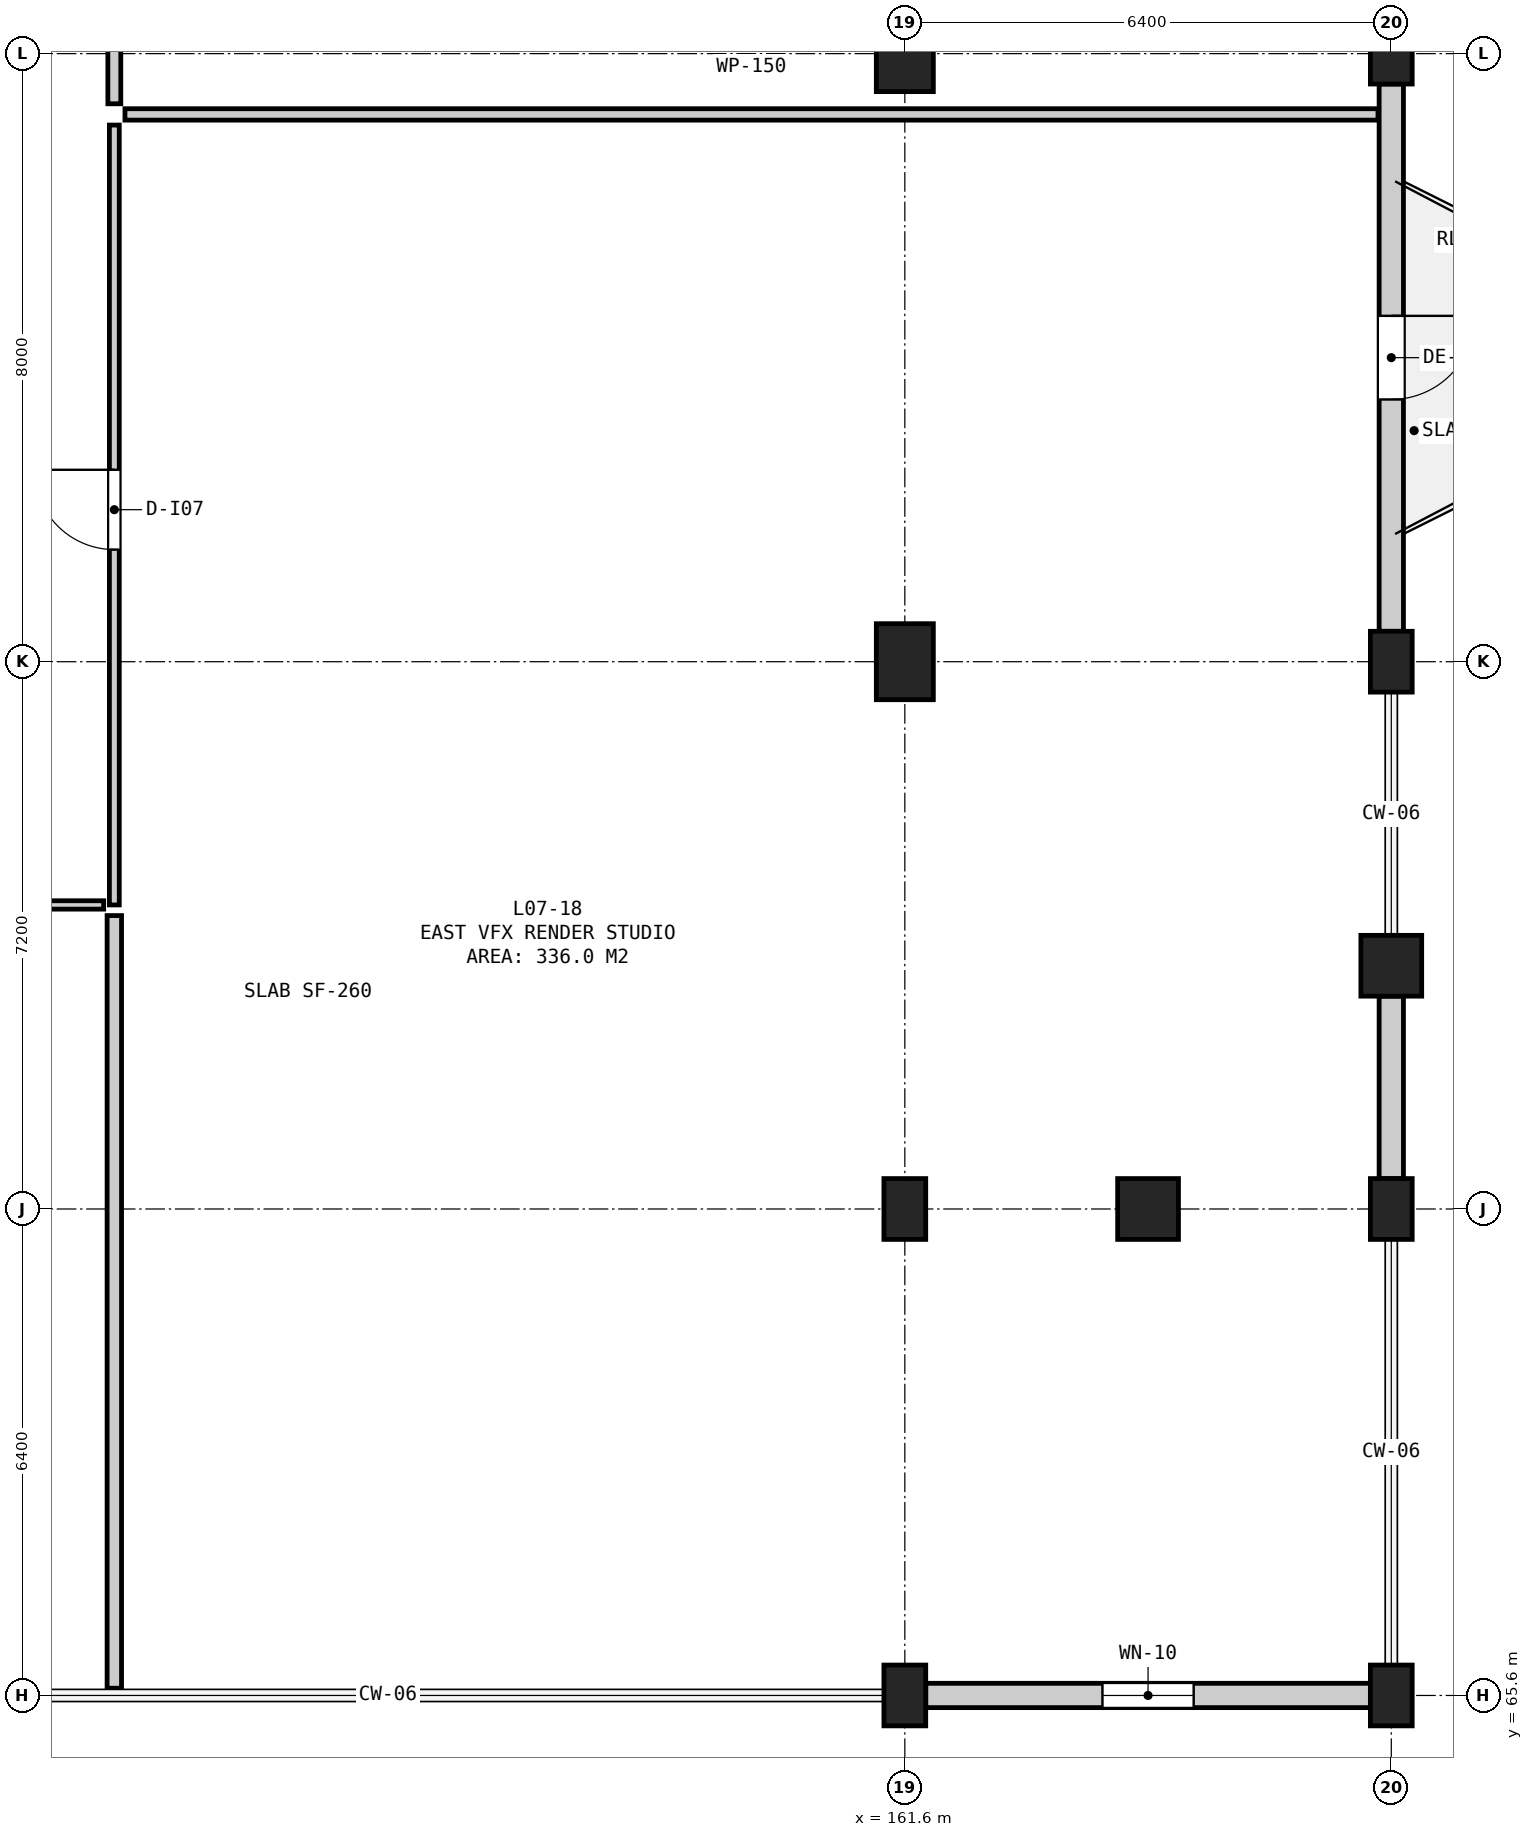
"""IFC4 building model, lengths in metres.
Left out: names, types, materials, properties, quantities, classifications, styles, units other than length and angle.
Written with IfcOpenShell. Run it as: python <this file> out.ifc"""

import sys

from ifc_helpers import new_model, si_unit, direction, frame, frame_2d, origin, origin_2d, place, context, subcontext, project, spatial, rectangle, circle, extrude, element, fill, save


model = new_model("IFC4")
c1 = context("Model", 3, precision=1e-05, world=origin(), true_north=direction((0.0, 1.0)))
c2 = subcontext(c1, "Body", "Model", "MODEL_VIEW")
j1 = project(units=[si_unit("LENGTHUNIT", "METRE"), si_unit("PLANEANGLEUNIT", "RADIAN")], contexts=[c1])
p1 = place(None, origin())
s1 = spatial("IfcSite", under=j1, at=p1, CompositionType="ELEMENT")
p2 = place(p1, origin())
s2 = spatial("IfcBuilding", under=s1, at=p2, CompositionType="ELEMENT")
p3 = place(p2, frame((0.0, 0.0, 31.7)))
s3 = spatial("IfcBuildingStorey", under=s2, at=p3, CompositionType="ELEMENT", Elevation=31.7)
for number, where, z_axis, x_axis in (
    (1, (161.6, 65.6, 0.0), (0.0, 0.0, 1.0), (1.0, 0.0, 0.0)),
    (2, (161.6, 72.0, 0.0), (0.0, 0.0, 1.0), (1.0, 0.0, 0.0)),
):
    element("IfcColumn", number, at=place(p3, frame(where, z_axis=z_axis, x_axis=x_axis)), inside=s3, PredefinedType="COLUMN", context=c2, shape_type="SweptSolid", body=[
        extrude(rectangle(XDim=0.55, YDim=0.8, at=origin_2d()), origin(), (0.0, 0.0, 1.0), 3.9),
    ])
for number, where, z_axis, x_axis in (
    (3, (161.6, 79.2, 0.0), (0.0, 0.0, 1.0), (1.0, 0.0, 0.0)),
    (4, (161.6, 87.2, 0.0), (0.0, 0.0, 1.0), (1.0, 0.0, 0.0)),
):
    element("IfcColumn", number, at=place(p3, frame(where, z_axis=z_axis, x_axis=x_axis)), inside=s3, PredefinedType="COLUMN", context=c2, shape_type="SweptSolid", body=[
        extrude(rectangle(XDim=0.75, YDim=1.0, at=origin_2d()), origin(), (0.0, 0.0, 1.0), 3.9),
    ])
p4 = place(p3, frame((164.8, 72.0, 0.0), z_axis=(0.0, 0.0, 1.0), x_axis=(1.0, 0.0, 0.0)))
e5 = element("IfcColumn", 5, at=p4, inside=s3, PredefinedType="COLUMN", context=c2, shape_type="SweptSolid", body=[
    extrude(circle(Radius=0.4, at=origin_2d()), origin(), (0.0, 0.0, 1.0), 3.9),
])
for number, where, z_axis, x_axis in (
    (6, (168.0, 65.6, 0.0), (0.0, 0.0, 1.0), (1.0, 0.0, 0.0)),
    (7, (168.0, 72.0, 0.0), (0.0, 0.0, 1.0), (1.0, 0.0, 0.0)),
):
    element("IfcColumn", number, at=place(p3, frame(where, z_axis=z_axis, x_axis=x_axis)), inside=s3, PredefinedType="COLUMN", context=c2, shape_type="SweptSolid", body=[
        extrude(rectangle(XDim=0.55, YDim=0.8, at=origin_2d()), origin(), (0.0, 0.0, 1.0), 3.9),
    ])
p5 = place(p3, frame((168.0, 75.2, 0.0), z_axis=(0.0, 0.0, 1.0), x_axis=(1.0, 0.0, 0.0)))
e8 = element("IfcColumn", 8, at=p5, inside=s3, PredefinedType="COLUMN", context=c2, shape_type="SweptSolid", body=[
    extrude(circle(Radius=0.4, at=origin_2d()), origin(), (0.0, 0.0, 1.0), 3.9),
])
for number, where, z_axis, x_axis in (
    (9, (168.0, 79.2, 0.0), (0.0, 0.0, 1.0), (1.0, 0.0, 0.0)),
    (10, (168.0, 87.2, 0.0), (0.0, 0.0, 1.0), (1.0, 0.0, 0.0)),
):
    element("IfcColumn", number, at=place(p3, frame(where, z_axis=z_axis, x_axis=x_axis)), inside=s3, PredefinedType="COLUMN", context=c2, shape_type="SweptSolid", body=[
        extrude(rectangle(XDim=0.55, YDim=0.8, at=origin_2d()), origin(), (0.0, 0.0, 1.0), 3.9),
    ])
p6 = place(p3, frame((161.875, 65.6, 0.0), z_axis=(0.0, 0.0, 1.0), x_axis=(1.0, 0.0, 0.0)))
e11 = element("IfcWall", 11, at=p6, inside=s3, PredefinedType="SOLIDWALL", context=c2, shape_type="SweptSolid", body=[
    extrude(rectangle(XDim=5.85, YDim=0.32, at=frame_2d((2.925, 0.0))), origin(), (0.0, 0.0, 1.0), 3.04),
])
p7 = place(p6, frame((2.325, 0.0, 0.9)))
e12 = element("IfcOpeningElement", 12, at=p7, cuts=e11, PredefinedType="OPENING", context=c2, shape_type="SweptSolid", body=[
    extrude(rectangle(XDim=1.2, YDim=1.7, at=frame_2d((0.6, 0.85))), frame((0.0, 0.172, 0.0), z_axis=(0.0, -1.0, 0.0), x_axis=(1.0, 0.0, 0.0)), (0.0, 0.0, 1.0), 0.344),
])
p8 = place(p3, frame((168.0, 72.4, 0.0), z_axis=(0.0, 0.0, 1.0), x_axis=(0.0, 1.0, 0.0)))
e13 = element("IfcWall", 13, at=p8, inside=s3, PredefinedType="SOLIDWALL", context=c2, shape_type="SweptSolid", body=[
    extrude(rectangle(XDim=2.4, YDim=0.32, at=frame_2d((1.2, 0.0))), origin(), (0.0, 0.0, 1.0), 3.04),
])
p9 = place(p3, frame((168.0, 79.6, 0.0), z_axis=(0.0, 0.0, 1.0), x_axis=(0.0, 1.0, 0.0)))
e14 = element("IfcWall", 14, at=p9, inside=s3, PredefinedType="SOLIDWALL", context=c2, shape_type="SweptSolid", body=[
    extrude(rectangle(XDim=7.2, YDim=0.32, at=frame_2d((3.6, 0.0))), origin(), (0.0, 0.0, 1.0), 3.025),
])
p10 = place(p9, frame((3.05, 0.0, 0.0)))
e15 = element("IfcOpeningElement", 15, at=p10, cuts=e14, PredefinedType="OPENING", context=c2, shape_type="SweptSolid", body=[
    extrude(rectangle(XDim=1.1, YDim=2.2, at=frame_2d((0.55, 1.1))), frame((0.0, 0.172, 0.0), z_axis=(0.0, -1.0, 0.0), x_axis=(1.0, 0.0, 0.0)), (0.0, 0.0, 1.0), 0.344),
])
p11 = place(p3, frame((139.14, 76.0, 0.0), z_axis=(0.0, 0.0, 1.0), x_axis=(1.0, 0.0, 0.0)))
e16 = element("IfcWall", 16, at=p11, inside=s3, PredefinedType="PARTITIONING", context=c2, shape_type="SweptSolid", body=[
    extrude(rectangle(XDim=11.92, YDim=0.11, at=frame_2d((5.96, 0.0))), origin(), (0.0, 0.0, 1.0), 3.62),
])
p12 = place(p11, frame((5.435, 0.0, 0.0)))
e17 = element("IfcOpeningElement", 17, at=p12, cuts=e16, PredefinedType="OPENING", context=c2, shape_type="SweptSolid", body=[
    extrude(rectangle(XDim=1.05, YDim=2.15, at=frame_2d((0.525, 1.075))), frame((0.0, 0.067, 0.0), z_axis=(0.0, -1.0, 0.0), x_axis=(1.0, 0.0, 0.0)), (0.0, 0.0, 1.0), 0.134),
])
p13 = place(p3, frame((151.2, 65.695, 0.0), z_axis=(0.0, 0.0, 1.0), x_axis=(0.0, 1.0, 0.0)))
e18 = element("IfcWall", 18, at=p13, inside=s3, PredefinedType="PARTITIONING", context=c2, shape_type="SweptSolid", body=[
    extrude(rectangle(XDim=10.165, YDim=0.19, at=frame_2d((5.083, 0.0))), origin(), (0.0, 0.0, 1.0), 3.62),
])
p14 = place(p3, frame((151.34, 86.4, 0.0), z_axis=(0.0, 0.0, 1.0), x_axis=(1.0, 0.0, 0.0)))
e19 = element("IfcWall", 19, at=p14, inside=s3, PredefinedType="PARTITIONING", context=c2, shape_type="SweptSolid", body=[
    extrude(rectangle(XDim=16.485, YDim=0.15, at=frame_2d((8.242, 0.0))), origin(), (0.0, 0.0, 1.0), 3.62),
])
p15 = place(p3, frame((151.2, 76.0, 0.0), z_axis=(0.0, 0.0, 1.0), x_axis=(0.0, 1.0, 0.0)))
e20 = element("IfcWall", 20, at=p15, inside=s3, PredefinedType="PARTITIONING", context=c2, shape_type="SweptSolid", body=[
    extrude(rectangle(XDim=10.26, YDim=0.13, at=frame_2d((5.13, 0.0))), origin(), (0.0, 0.0, 1.0), 3.62),
])
p16 = place(p15, frame((4.675, 0.0, 0.0)))
e21 = element("IfcOpeningElement", 21, at=p16, cuts=e20, PredefinedType="OPENING", context=c2, shape_type="SweptSolid", body=[
    extrude(rectangle(XDim=1.05, YDim=2.15, at=frame_2d((0.525, 1.075))), frame((0.0, 0.077, 0.0), z_axis=(0.0, -1.0, 0.0), x_axis=(1.0, 0.0, 0.0)), (0.0, 0.0, 1.0), 0.154),
])
p17 = place(p3, frame((151.2, 86.54, 0.0), z_axis=(0.0, 0.0, 1.0), x_axis=(0.0, 1.0, 0.0)))
e22 = element("IfcWall", 22, at=p17, inside=s3, PredefinedType="PARTITIONING", context=c2, shape_type="SweptSolid", body=[
    extrude(rectangle(XDim=11.72, YDim=0.17, at=frame_2d((5.86, 0.0))), origin(), (0.0, 0.0, 1.0), 3.62),
])
p18 = place(p17, frame((4.435, 0.0, 0.0)))
e23 = element("IfcOpeningElement", 23, at=p18, cuts=e22, PredefinedType="OPENING", context=c2, shape_type="SweptSolid", body=[
    extrude(rectangle(XDim=1.05, YDim=2.15, at=frame_2d((0.525, 1.075))), frame((0.0, 0.097, 0.0), z_axis=(0.0, -1.0, 0.0), x_axis=(1.0, 0.0, 0.0)), (0.0, 0.0, 1.0), 0.194),
])
p19 = place(p7, origin())
e24 = element("IfcWindow", 24, at=p19, inside=s3, PartitioningType="SINGLE_PANEL", PredefinedType="WINDOW", context=c2, shape_type="SweptSolid", body=[
    extrude(rectangle(XDim=1.2, YDim=1.7, at=frame_2d((0.6, 0.85))), frame((0.0, 0.03, 0.0), z_axis=(0.0, -1.0, 0.0), x_axis=(1.0, 0.0, 0.0)), (0.0, 0.0, 1.0), 0.06),
])
fill(e12, e24)
p20 = place(p10, frame((1.1, 0.0, 0.0), z_axis=(0.0, 0.0, 1.0), x_axis=(-1.0, 0.0, 0.0)))
e25 = element("IfcDoor", 25, at=p20, inside=s3, OperationType="SINGLE_SWING_LEFT", PredefinedType="DOOR", context=c2, shape_type="SweptSolid", body=[
    extrude(rectangle(XDim=1.1, YDim=2.2, at=frame_2d((0.55, 1.1))), frame((0.0, 0.025, 0.0), z_axis=(0.0, -1.0, 0.0), x_axis=(1.0, 0.0, 0.0)), (0.0, 0.0, 1.0), 0.05),
])
fill(e15, e25)
p21 = place(p16, origin())
e26 = element("IfcDoor", 26, at=p21, inside=s3, OperationType="SINGLE_SWING_RIGHT", PredefinedType="DOOR", context=c2, shape_type="SweptSolid", body=[
    extrude(rectangle(XDim=1.05, YDim=2.15, at=frame_2d((0.525, 1.075))), frame((0.0, 0.025, 0.0), z_axis=(0.0, -1.0, 0.0), x_axis=(1.0, 0.0, 0.0)), (0.0, 0.0, 1.0), 0.05),
])
fill(e21, e26)
save(model, sys.argv[1])
